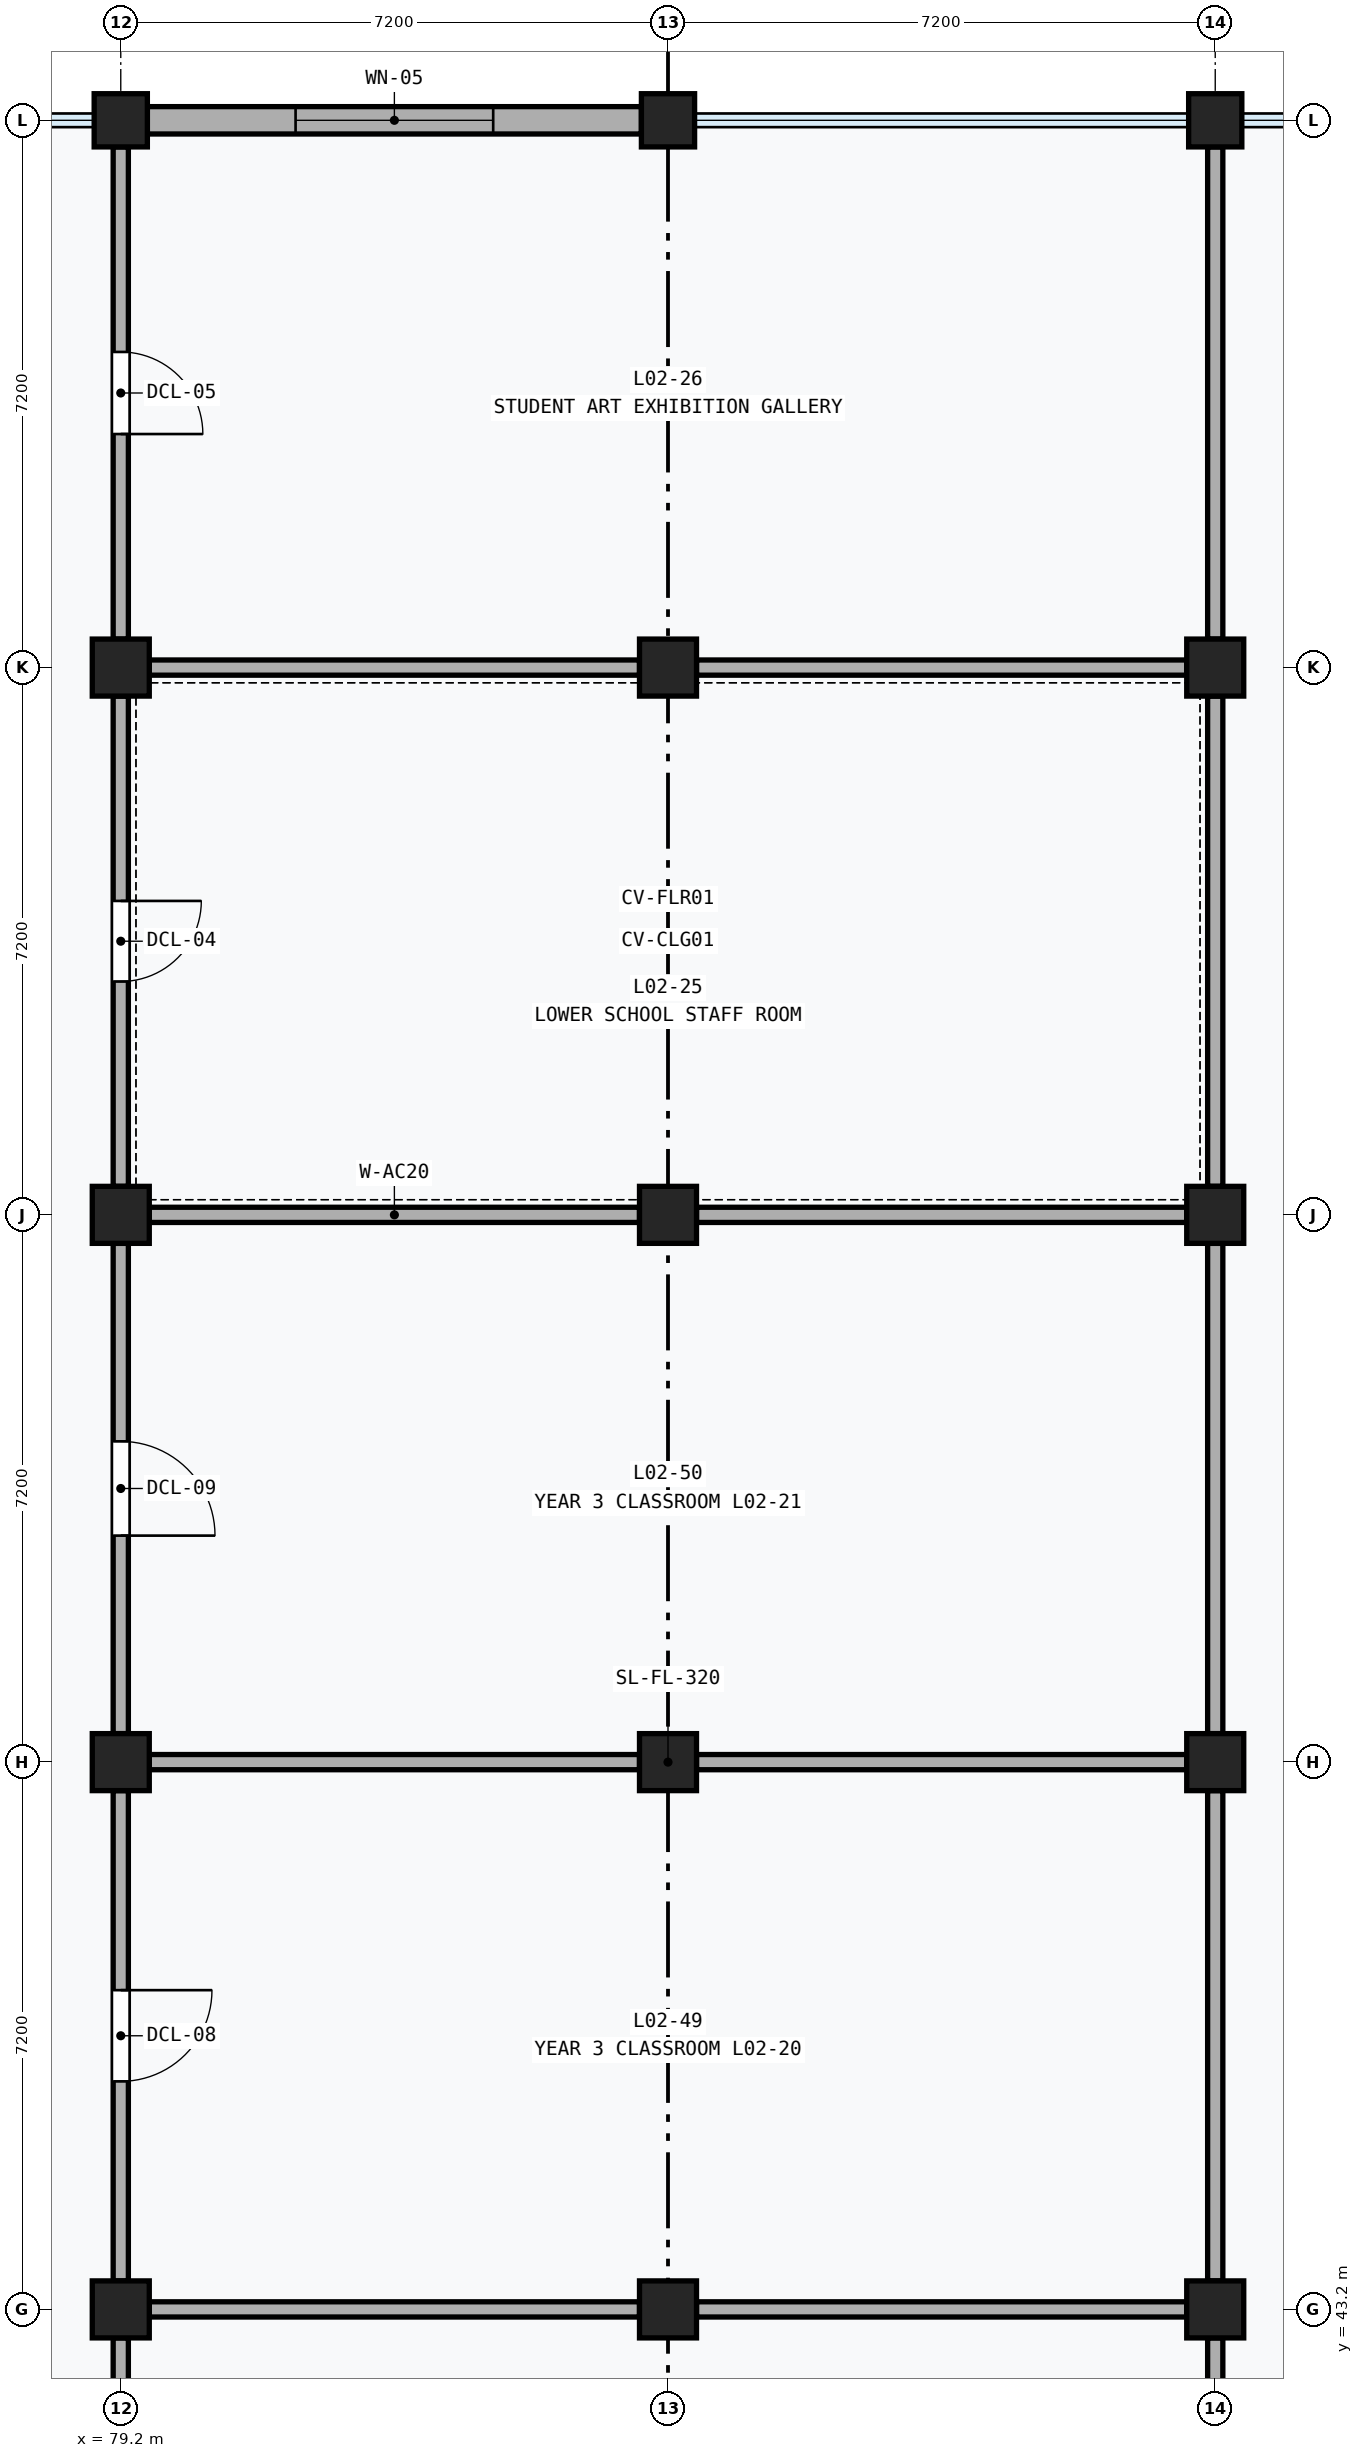
"""IFC4 building model, lengths in metres.
Left out: names, types, materials, properties, quantities, classifications, styles, units other than length and angle.
Written with IfcOpenShell. Run it as: python <this file> out.ifc"""

import sys

from ifc_helpers import new_model, si_unit, direction, frame, frame_2d, origin, origin_2d, place, context, subcontext, project, spatial, rectangle, extrude, element, fill, save


model = new_model("IFC4")
c1 = context("Model", 3, precision=1e-05, world=origin(), true_north=direction((0.0, 1.0)))
c2 = subcontext(c1, "Body", "Model", "MODEL_VIEW")
j1 = project(units=[si_unit("LENGTHUNIT", "METRE"), si_unit("PLANEANGLEUNIT", "RADIAN")], contexts=[c1])
p1 = place(None, origin())
s1 = spatial("IfcSite", under=j1, at=p1, CompositionType="ELEMENT")
p2 = place(p1, origin())
s2 = spatial("IfcBuilding", under=s1, at=p2, CompositionType="ELEMENT")
p3 = place(p2, frame((0.0, 0.0, 9.6)))
s3 = spatial("IfcBuildingStorey", under=s2, at=p3, CompositionType="ELEMENT", Elevation=9.6)
for number, where, z_axis, x_axis in (
    (1, (79.2, 43.2, 0.0), (0.0, 0.0, 1.0), (1.0, 0.0, 0.0)),
    (2, (79.2, 50.4, 0.0), (0.0, 0.0, 1.0), (1.0, 0.0, 0.0)),
    (3, (79.2, 57.6, 0.0), (0.0, 0.0, 1.0), (1.0, 0.0, 0.0)),
    (4, (79.2, 64.8, 0.0), (0.0, 0.0, 1.0), (1.0, 0.0, 0.0)),
):
    element("IfcColumn", number, at=place(p3, frame(where, z_axis=z_axis, x_axis=x_axis)), inside=s3, PredefinedType="COLUMN", context=c2, shape_type="SweptSolid", body=[
        extrude(rectangle(XDim=0.75, YDim=0.75, at=origin_2d()), origin(), (0.0, 0.0, 1.0), 4.8),
    ])
p4 = place(p3, frame((79.2, 72.0, 0.0), z_axis=(0.0, 0.0, 1.0), x_axis=(1.0, 0.0, 0.0)))
e5 = element("IfcColumn", 5, at=p4, inside=s3, PredefinedType="COLUMN", context=c2, shape_type="SweptSolid", body=[
    extrude(rectangle(XDim=0.7, YDim=0.7, at=origin_2d()), origin(), (0.0, 0.0, 1.0), 4.8),
])
for number, where, z_axis, x_axis in (
    (6, (86.4, 43.2, 0.0), (0.0, 0.0, 1.0), (1.0, 0.0, 0.0)),
    (7, (86.4, 50.4, 0.0), (0.0, 0.0, 1.0), (1.0, 0.0, 0.0)),
    (8, (86.4, 57.6, 0.0), (0.0, 0.0, 1.0), (1.0, 0.0, 0.0)),
    (9, (86.4, 64.8, 0.0), (0.0, 0.0, 1.0), (1.0, 0.0, 0.0)),
):
    element("IfcColumn", number, at=place(p3, frame(where, z_axis=z_axis, x_axis=x_axis)), inside=s3, PredefinedType="COLUMN", context=c2, shape_type="SweptSolid", body=[
        extrude(rectangle(XDim=0.75, YDim=0.75, at=origin_2d()), origin(), (0.0, 0.0, 1.0), 4.8),
    ])
p5 = place(p3, frame((86.4, 72.0, 0.0), z_axis=(0.0, 0.0, 1.0), x_axis=(1.0, 0.0, 0.0)))
e10 = element("IfcColumn", 10, at=p5, inside=s3, PredefinedType="COLUMN", context=c2, shape_type="SweptSolid", body=[
    extrude(rectangle(XDim=0.7, YDim=0.7, at=origin_2d()), origin(), (0.0, 0.0, 1.0), 4.8),
])
for number, where, z_axis, x_axis in (
    (11, (93.6, 43.2, 0.0), (0.0, 0.0, 1.0), (1.0, 0.0, 0.0)),
    (12, (93.6, 50.4, 0.0), (0.0, 0.0, 1.0), (1.0, 0.0, 0.0)),
    (13, (93.6, 57.6, 0.0), (0.0, 0.0, 1.0), (1.0, 0.0, 0.0)),
    (14, (93.6, 64.8, 0.0), (0.0, 0.0, 1.0), (1.0, 0.0, 0.0)),
):
    element("IfcColumn", number, at=place(p3, frame(where, z_axis=z_axis, x_axis=x_axis)), inside=s3, PredefinedType="COLUMN", context=c2, shape_type="SweptSolid", body=[
        extrude(rectangle(XDim=0.75, YDim=0.75, at=origin_2d()), origin(), (0.0, 0.0, 1.0), 4.8),
    ])
p6 = place(p3, frame((93.6, 72.0, 0.0), z_axis=(0.0, 0.0, 1.0), x_axis=(1.0, 0.0, 0.0)))
e15 = element("IfcColumn", 15, at=p6, inside=s3, PredefinedType="COLUMN", context=c2, shape_type="SweptSolid", body=[
    extrude(rectangle(XDim=0.7, YDim=0.7, at=origin_2d()), origin(), (0.0, 0.0, 1.0), 4.8),
])
p7 = place(p3, frame((79.55, 72.0, 0.0), z_axis=(0.0, 0.0, 1.0), x_axis=(1.0, 0.0, 0.0)))
e16 = element("IfcWall", 16, at=p7, inside=s3, PredefinedType="SOLIDWALL", context=c2, shape_type="SweptSolid", body=[
    extrude(rectangle(XDim=6.5, YDim=0.36, at=frame_2d((3.25, 0.0))), origin(), (0.0, 0.0, 1.0), 3.88),
])
p8 = place(p7, frame((1.95, 0.0, 0.9)))
e17 = element("IfcOpeningElement", 17, at=p8, cuts=e16, PredefinedType="OPENING", context=c2, shape_type="SweptSolid", body=[
    extrude(rectangle(XDim=2.6, YDim=1.8, at=frame_2d((1.3, 0.9))), frame((0.0, 0.192, 0.0), z_axis=(0.0, -1.0, 0.0), x_axis=(1.0, 0.0, 0.0)), (0.0, 0.0, 1.0), 0.384),
])
p9 = place(p3, frame((79.575, 57.6, 0.0), z_axis=(0.0, 0.0, 1.0), x_axis=(1.0, 0.0, 0.0)))
e18 = element("IfcWall", 18, at=p9, inside=s3, PredefinedType="PARTITIONING", context=c2, shape_type="SweptSolid", body=[
    extrude(rectangle(XDim=6.45, YDim=0.2, at=frame_2d((3.225, 0.0))), origin(), (0.0, 0.0, 1.0), 3.74),
])
p10 = place(p3, frame((79.575, 64.8, 0.0), z_axis=(0.0, 0.0, 1.0), x_axis=(1.0, 0.0, 0.0)))
e19 = element("IfcWall", 19, at=p10, inside=s3, PredefinedType="PARTITIONING", context=c2, shape_type="SweptSolid", body=[
    extrude(rectangle(XDim=6.45, YDim=0.2, at=frame_2d((3.225, 0.0))), origin(), (0.0, 0.0, 1.0), 3.81),
])
p11 = place(p3, frame((79.2, 57.975, 0.0), z_axis=(0.0, 0.0, 1.0), x_axis=(0.0, 1.0, 0.0)))
e20 = element("IfcWall", 20, at=p11, inside=s3, PredefinedType="PARTITIONING", context=c2, shape_type="SweptSolid", body=[
    extrude(rectangle(XDim=6.45, YDim=0.2, at=frame_2d((3.225, 0.0))), origin(), (0.0, 0.0, 1.0), 3.74),
])
p12 = place(p11, frame((2.695, 0.0, 0.0)))
e21 = element("IfcOpeningElement", 21, at=p12, cuts=e20, PredefinedType="OPENING", context=c2, shape_type="SweptSolid", body=[
    extrude(rectangle(XDim=1.06, YDim=2.16, at=frame_2d((0.53, 1.08))), frame((0.0, 0.112, 0.0), z_axis=(0.0, -1.0, 0.0), x_axis=(1.0, 0.0, 0.0)), (0.0, 0.0, 1.0), 0.224),
])
p13 = place(p3, frame((86.775, 57.6, 0.0), z_axis=(0.0, 0.0, 1.0), x_axis=(1.0, 0.0, 0.0)))
e22 = element("IfcWall", 22, at=p13, inside=s3, PredefinedType="PARTITIONING", context=c2, shape_type="SweptSolid", body=[
    extrude(rectangle(XDim=6.45, YDim=0.2, at=frame_2d((3.225, 0.0))), origin(), (0.0, 0.0, 1.0), 3.81),
])
p14 = place(p3, frame((86.775, 64.8, 0.0), z_axis=(0.0, 0.0, 1.0), x_axis=(1.0, 0.0, 0.0)))
e23 = element("IfcWall", 23, at=p14, inside=s3, PredefinedType="PARTITIONING", context=c2, shape_type="SweptSolid", body=[
    extrude(rectangle(XDim=6.45, YDim=0.2, at=frame_2d((3.225, 0.0))), origin(), (0.0, 0.0, 1.0), 3.74),
])
p15 = place(p3, frame((93.6, 57.975, 0.0), z_axis=(0.0, 0.0, 1.0), x_axis=(0.0, 1.0, 0.0)))
e24 = element("IfcWall", 24, at=p15, inside=s3, PredefinedType="PARTITIONING", context=c2, shape_type="SweptSolid", body=[
    extrude(rectangle(XDim=6.45, YDim=0.2, at=frame_2d((3.225, 0.0))), origin(), (0.0, 0.0, 1.0), 3.74),
])
p16 = place(p3, frame((79.2, 65.175, 0.0), z_axis=(0.0, 0.0, 1.0), x_axis=(0.0, 1.0, 0.0)))
e25 = element("IfcWall", 25, at=p16, inside=s3, PredefinedType="PARTITIONING", context=c2, shape_type="SweptSolid", body=[
    extrude(rectangle(XDim=6.475, YDim=0.2, at=frame_2d((3.237, 0.0))), origin(), (0.0, 0.0, 1.0), 3.74),
])
p17 = place(p16, frame((2.698, 0.0, 0.0)))
e26 = element("IfcOpeningElement", 26, at=p17, cuts=e25, PredefinedType="OPENING", context=c2, shape_type="SweptSolid", body=[
    extrude(rectangle(XDim=1.08, YDim=2.18, at=frame_2d((0.54, 1.09))), frame((0.0, 0.112, 0.0), z_axis=(0.0, -1.0, 0.0), x_axis=(1.0, 0.0, 0.0)), (0.0, 0.0, 1.0), 0.224),
])
p18 = place(p3, frame((93.6, 65.175, 0.0), z_axis=(0.0, 0.0, 1.0), x_axis=(0.0, 1.0, 0.0)))
e27 = element("IfcWall", 27, at=p18, inside=s3, PredefinedType="PARTITIONING", context=c2, shape_type="SweptSolid", body=[
    extrude(rectangle(XDim=6.475, YDim=0.2, at=frame_2d((3.237, 0.0))), origin(), (0.0, 0.0, 1.0), 3.74),
])
p19 = place(p3, frame((79.575, 43.2, 0.0), z_axis=(0.0, 0.0, 1.0), x_axis=(1.0, 0.0, 0.0)))
e28 = element("IfcWall", 28, at=p19, inside=s3, PredefinedType="PARTITIONING", context=c2, shape_type="SweptSolid", body=[
    extrude(rectangle(XDim=6.45, YDim=0.2, at=frame_2d((3.225, 0.0))), origin(), (0.0, 0.0, 1.0), 3.74),
])
p20 = place(p3, frame((79.2, 36.375, 0.0), z_axis=(0.0, 0.0, 1.0), x_axis=(0.0, 1.0, 0.0)))
e29 = element("IfcWall", 29, at=p20, inside=s3, PredefinedType="PARTITIONING", context=c2, shape_type="SweptSolid", body=[
    extrude(rectangle(XDim=6.45, YDim=0.2, at=frame_2d((3.225, 0.0))), origin(), (0.0, 0.0, 1.0), 3.74),
])
p21 = place(p20, frame((2.645, 0.0, 0.0)))
e30 = element("IfcOpeningElement", 30, at=p21, cuts=e29, PredefinedType="OPENING", context=c2, shape_type="SweptSolid", body=[
    extrude(rectangle(XDim=1.16, YDim=2.22, at=frame_2d((0.58, 1.11))), frame((0.0, 0.112, 0.0), z_axis=(0.0, -1.0, 0.0), x_axis=(1.0, 0.0, 0.0)), (0.0, 0.0, 1.0), 0.224),
])
p22 = place(p3, frame((86.775, 43.2, 0.0), z_axis=(0.0, 0.0, 1.0), x_axis=(1.0, 0.0, 0.0)))
e31 = element("IfcWall", 31, at=p22, inside=s3, PredefinedType="PARTITIONING", context=c2, shape_type="SweptSolid", body=[
    extrude(rectangle(XDim=6.45, YDim=0.2, at=frame_2d((3.225, 0.0))), origin(), (0.0, 0.0, 1.0), 3.74),
])
for number, where, z_axis, x_axis in (
    (32, (93.6, 36.375, 0.0), (0.0, 0.0, 1.0), (0.0, 1.0, 0.0)),
    (33, (79.575, 50.4, 0.0), (0.0, 0.0, 1.0), (1.0, 0.0, 0.0)),
):
    element("IfcWall", number, at=place(p3, frame(where, z_axis=z_axis, x_axis=x_axis)), inside=s3, PredefinedType="PARTITIONING", context=c2, shape_type="SweptSolid", body=[
        extrude(rectangle(XDim=6.45, YDim=0.2, at=frame_2d((3.225, 0.0))), origin(), (0.0, 0.0, 1.0), 3.74),
    ])
p23 = place(p3, frame((79.2, 43.575, 0.0), z_axis=(0.0, 0.0, 1.0), x_axis=(0.0, 1.0, 0.0)))
e34 = element("IfcWall", 34, at=p23, inside=s3, PredefinedType="PARTITIONING", context=c2, shape_type="SweptSolid", body=[
    extrude(rectangle(XDim=6.45, YDim=0.2, at=frame_2d((3.225, 0.0))), origin(), (0.0, 0.0, 1.0), 3.74),
])
p24 = place(p23, frame((2.625, 0.0, 0.0)))
e35 = element("IfcOpeningElement", 35, at=p24, cuts=e34, PredefinedType="OPENING", context=c2, shape_type="SweptSolid", body=[
    extrude(rectangle(XDim=1.2, YDim=2.24, at=frame_2d((0.6, 1.12))), frame((0.0, 0.112, 0.0), z_axis=(0.0, -1.0, 0.0), x_axis=(1.0, 0.0, 0.0)), (0.0, 0.0, 1.0), 0.224),
])
p25 = place(p3, frame((86.775, 50.4, 0.0), z_axis=(0.0, 0.0, 1.0), x_axis=(1.0, 0.0, 0.0)))
e36 = element("IfcWall", 36, at=p25, inside=s3, PredefinedType="PARTITIONING", context=c2, shape_type="SweptSolid", body=[
    extrude(rectangle(XDim=6.45, YDim=0.2, at=frame_2d((3.225, 0.0))), origin(), (0.0, 0.0, 1.0), 3.74),
])
p26 = place(p3, frame((93.6, 43.575, 0.0), z_axis=(0.0, 0.0, 1.0), x_axis=(0.0, 1.0, 0.0)))
e37 = element("IfcWall", 37, at=p26, inside=s3, PredefinedType="PARTITIONING", context=c2, shape_type="SweptSolid", body=[
    extrude(rectangle(XDim=6.45, YDim=0.2, at=frame_2d((3.225, 0.0))), origin(), (0.0, 0.0, 1.0), 3.74),
])
p27 = place(p3, frame((79.2, 50.775, 0.0), z_axis=(0.0, 0.0, 1.0), x_axis=(0.0, 1.0, 0.0)))
e38 = element("IfcWall", 38, at=p27, inside=s3, PredefinedType="PARTITIONING", context=c2, shape_type="SweptSolid", body=[
    extrude(rectangle(XDim=6.45, YDim=0.2, at=frame_2d((3.225, 0.0))), origin(), (0.0, 0.0, 1.0), 3.74),
])
p28 = place(p27, frame((2.605, 0.0, 0.0)))
e39 = element("IfcOpeningElement", 39, at=p28, cuts=e38, PredefinedType="OPENING", context=c2, shape_type="SweptSolid", body=[
    extrude(rectangle(XDim=1.24, YDim=2.26, at=frame_2d((0.62, 1.13))), frame((0.0, 0.112, 0.0), z_axis=(0.0, -1.0, 0.0), x_axis=(1.0, 0.0, 0.0)), (0.0, 0.0, 1.0), 0.224),
])
p29 = place(p3, frame((93.6, 50.775, 0.0), z_axis=(0.0, 0.0, 1.0), x_axis=(0.0, 1.0, 0.0)))
e40 = element("IfcWall", 40, at=p29, inside=s3, PredefinedType="PARTITIONING", context=c2, shape_type="SweptSolid", body=[
    extrude(rectangle(XDim=6.45, YDim=0.2, at=frame_2d((3.225, 0.0))), origin(), (0.0, 0.0, 1.0), 3.74),
])
p30 = place(p8, origin())
e41 = element("IfcWindow", 41, at=p30, inside=s3, PartitioningType="SINGLE_PANEL", PredefinedType="WINDOW", context=c2, shape_type="SweptSolid", body=[
    extrude(rectangle(XDim=2.6, YDim=1.8, at=frame_2d((1.3, 0.9))), frame((0.0, 0.03, 0.0), z_axis=(0.0, -1.0, 0.0), x_axis=(1.0, 0.0, 0.0)), (0.0, 0.0, 1.0), 0.06),
])
fill(e17, e41)
p31 = place(p12, frame((1.06, 0.0, 0.0), z_axis=(0.0, 0.0, 1.0), x_axis=(-1.0, 0.0, 0.0)))
e42 = element("IfcDoor", 42, at=p31, inside=s3, OperationType="SINGLE_SWING_LEFT", PredefinedType="DOOR", context=c2, shape_type="SweptSolid", body=[
    extrude(rectangle(XDim=1.06, YDim=2.16, at=frame_2d((0.53, 1.08))), frame((0.0, 0.025, 0.0), z_axis=(0.0, -1.0, 0.0), x_axis=(1.0, 0.0, 0.0)), (0.0, 0.0, 1.0), 0.05),
])
fill(e21, e42)
p32 = place(p17, frame((1.08, 0.0, 0.0), z_axis=(0.0, 0.0, 1.0), x_axis=(-1.0, 0.0, 0.0)))
e43 = element("IfcDoor", 43, at=p32, inside=s3, OperationType="SINGLE_SWING_RIGHT", PredefinedType="DOOR", context=c2, shape_type="SweptSolid", body=[
    extrude(rectangle(XDim=1.08, YDim=2.18, at=frame_2d((0.54, 1.09))), frame((0.0, 0.025, 0.0), z_axis=(0.0, -1.0, 0.0), x_axis=(1.0, 0.0, 0.0)), (0.0, 0.0, 1.0), 0.05),
])
fill(e26, e43)
p33 = place(p24, frame((1.2, 0.0, 0.0), z_axis=(0.0, 0.0, 1.0), x_axis=(-1.0, 0.0, 0.0)))
e44 = element("IfcDoor", 44, at=p33, inside=s3, OperationType="SINGLE_SWING_LEFT", PredefinedType="DOOR", context=c2, shape_type="SweptSolid", body=[
    extrude(rectangle(XDim=1.2, YDim=2.24, at=frame_2d((0.6, 1.12))), frame((0.0, 0.025, 0.0), z_axis=(0.0, -1.0, 0.0), x_axis=(1.0, 0.0, 0.0)), (0.0, 0.0, 1.0), 0.05),
])
fill(e35, e44)
p34 = place(p28, frame((1.24, 0.0, 0.0), z_axis=(0.0, 0.0, 1.0), x_axis=(-1.0, 0.0, 0.0)))
e45 = element("IfcDoor", 45, at=p34, inside=s3, OperationType="SINGLE_SWING_RIGHT", PredefinedType="DOOR", context=c2, shape_type="SweptSolid", body=[
    extrude(rectangle(XDim=1.24, YDim=2.26, at=frame_2d((0.62, 1.13))), frame((0.0, 0.025, 0.0), z_axis=(0.0, -1.0, 0.0), x_axis=(1.0, 0.0, 0.0)), (0.0, 0.0, 1.0), 0.05),
])
fill(e39, e45)
save(model, sys.argv[1])
